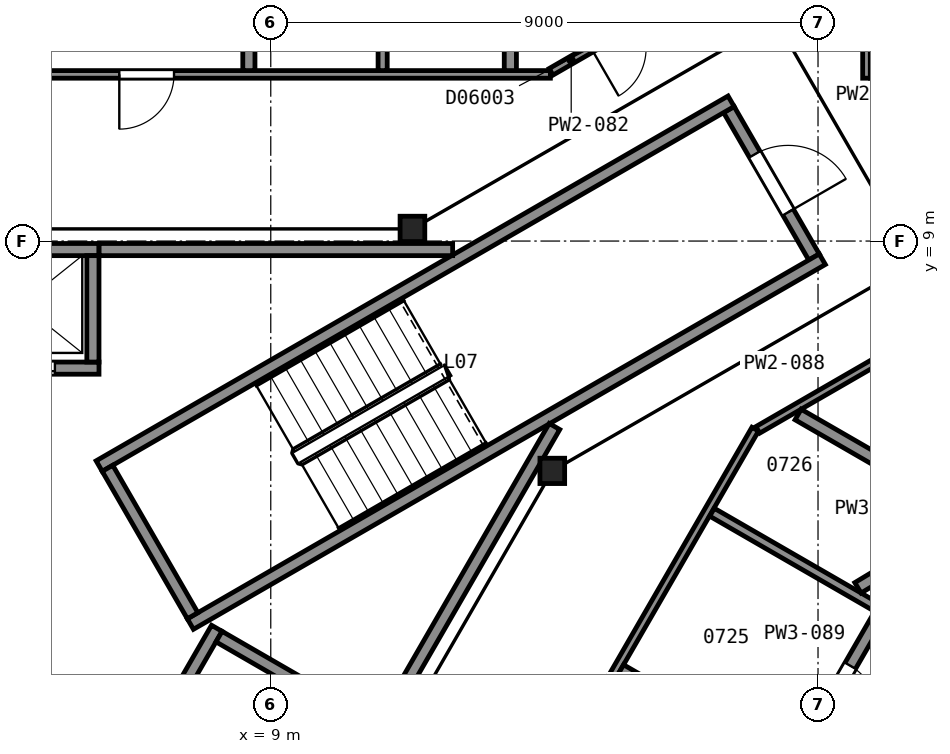
"""IFC4 building model, lengths in metres.
Left out: names, types, materials, properties, quantities, classifications, styles, units other than length and angle.
Written with IfcOpenShell. Run it as: python <this file> out.ifc"""

import sys

from ifc_helpers import new_model, si_unit, direction, frame, frame_2d, origin, origin_2d, place, context, subcontext, project, spatial, rectangle, i_section, extrude, element, fill, save


model = new_model("IFC4")
c1 = context("Model", 3, precision=1e-05, world=origin(), true_north=direction((0.0, 1.0)))
c2 = subcontext(c1, "Body", "Model", "MODEL_VIEW")
j1 = project(units=[si_unit("LENGTHUNIT", "METRE"), si_unit("PLANEANGLEUNIT", "RADIAN")], contexts=[c1])
p1 = place(None, origin())
s1 = spatial("IfcSite", under=j1, at=p1, CompositionType="ELEMENT")
p2 = place(p1, origin())
s2 = spatial("IfcBuilding", under=s1, at=p2, CompositionType="ELEMENT")
p3 = place(p2, frame((0.0, 0.0, 40.4)))
s3 = spatial("IfcBuildingStorey", under=s2, at=p3, CompositionType="ELEMENT", Elevation=40.4)
for number, where, z_axis, x_axis in (
    (1, (13.63, 5.22, 0.0), (0.0, 0.0, 1.0), (1.0, 0.0, 0.0)),
    (2, (11.33, 9.2, 0.0), (0.0, 0.0, 1.0), (1.0, 0.0, 0.0)),
):
    element("IfcColumn", number, at=place(p3, frame(where, z_axis=z_axis, x_axis=x_axis)), inside=s3, PredefinedType="COLUMN", context=c2, shape_type="SweptSolid", body=[
        extrude(i_section(OverallWidth=0.406, OverallDepth=0.417, WebThickness=0.03, FlangeThickness=0.048, FilletRadius=0.015, at=origin_2d()), origin(), (0.0, 0.0, 1.0), 3.6),
    ])
p4 = place(p3, frame((17.934, 8.738, 0.0), z_axis=(0.0, 0.0, 1.0), x_axis=(-0.49998411664, 0.866034573852, 0.0)))
e3 = element("IfcWall", 3, at=p4, inside=s3, PredefinedType="PARTITIONING", context=c2, shape_type="SweptSolid", body=[
    extrude(rectangle(XDim=2.8, YDim=0.2, at=frame_2d((1.4, 0.0))), origin(), (0.0, 0.0, 1.0), 3.35),
])
p5 = place(p4, frame((0.85, 0.0, 0.0)))
e4 = element("IfcOpeningElement", 4, at=p5, cuts=e3, PredefinedType="OPENING", context=c2, shape_type="SweptSolid", body=[
    extrude(rectangle(XDim=1.1, YDim=2.1, at=frame_2d((0.55, 1.05))), frame((0.0, 0.11, 0.0), z_axis=(0.0, -1.0, 0.0), x_axis=(1.0, 0.0, 0.0)), (0.0, 0.0, 1.0), 0.22),
])
for number, where, z_axis, x_axis in (
    (5, (6.178, 5.299, 0.0), (0.0, 0.0, 1.0), (0.866, 0.5, 0.0)),
    (6, (7.678, 2.701, 0.0), (0.0, 0.0, 1.0), (0.866, 0.5, 0.0)),
):
    element("IfcWall", number, at=place(p3, frame(where, z_axis=z_axis, x_axis=x_axis)), inside=s3, PredefinedType="PARTITIONING", context=c2, shape_type="SweptSolid", body=[
        extrude(rectangle(XDim=12.0, YDim=0.2, at=frame_2d((6.0, 0.0))), origin(), (0.0, 0.0, 1.0), 3.35),
    ])
p6 = place(p3, frame((7.715, 2.838, 0.0), z_axis=(0.0, 0.0, 1.0), x_axis=(-0.500049511043, 0.865996816683, 0.0)))
e7 = element("IfcWall", 7, at=p6, inside=s3, PredefinedType="PARTITIONING", context=c2, shape_type="SweptSolid", body=[
    extrude(rectangle(XDim=2.8, YDim=0.2, at=frame_2d((1.4, 0.0))), origin(), (0.0, 0.0, 1.0), 3.35),
])
p7 = place(p3, frame((3.625, 6.91, 0.0), z_axis=(0.0, 0.0, 1.0), x_axis=(1.0, 0.0, 0.0)))
e8 = element("IfcWall", 8, at=p7, inside=s3, PredefinedType="PARTITIONING", context=c2, shape_type="SweptSolid", body=[
    extrude(rectangle(XDim=2.55, YDim=0.2, at=frame_2d((1.275, 0.0))), origin(), (0.0, 0.0, 1.0), 3.6),
])
p8 = place(p7, frame((0.725, 0.0, 0.0)))
e9 = element("IfcOpeningElement", 9, at=p8, cuts=e8, PredefinedType="OPENING", context=c2, shape_type="SweptSolid", body=[
    extrude(rectangle(XDim=1.1, YDim=2.1, at=frame_2d((0.55, 1.05))), frame((0.0, 0.11, 0.0), z_axis=(0.0, -1.0, 0.0), x_axis=(1.0, 0.0, 0.0)), (0.0, 0.0, 1.0), 0.22),
])
p9 = place(p3, frame((3.625, 8.86, 0.0), z_axis=(0.0, 0.0, 1.0), x_axis=(1.0, 0.0, 0.0)))
e10 = element("IfcWall", 10, at=p9, inside=s3, PredefinedType="PARTITIONING", context=c2, shape_type="SweptSolid", body=[
    extrude(rectangle(XDim=2.55, YDim=0.2, at=frame_2d((1.275, 0.0))), origin(), (0.0, 0.0, 1.0), 3.6),
])
p10 = place(p3, frame((5.663, -1.612, 0.0), z_axis=(0.0, 0.0, 1.0), x_axis=(0.49998122708, 0.866036242063, 0.0)))
e11 = element("IfcWall", 11, at=p10, inside=s3, PredefinedType="PARTITIONING", context=c2, shape_type="SweptSolid", body=[
    extrude(rectangle(XDim=4.9, YDim=0.2, at=frame_2d((2.45, 0.0))), origin(), (0.0, 0.0, 1.0), 3.6),
])
p11 = place(p3, frame((6.075, 7.01, 0.0), z_axis=(0.0, 0.0, 1.0), x_axis=(0.0, 1.0, 0.0)))
e12 = element("IfcWall", 12, at=p11, inside=s3, PredefinedType="PARTITIONING", context=c2, shape_type="SweptSolid", body=[
    extrude(rectangle(XDim=1.75, YDim=0.2, at=frame_2d((0.875, 0.0))), origin(), (0.0, 0.0, 1.0), 3.6),
])
p12 = place(p3, frame((9.665, 1.62, 0.0), z_axis=(0.0, 0.0, 1.0), x_axis=(-0.866002029911, 0.500040482552, 0.0)))
e13 = element("IfcWall", 13, at=p12, inside=s3, PredefinedType="PARTITIONING", context=c2, shape_type="SweptSolid", body=[
    extrude(rectangle(XDim=1.75, YDim=0.2, at=frame_2d((0.875, 0.0))), origin(), (0.0, 0.0, 1.0), 3.6),
])
p13 = place(p3, frame((6.177, 8.86, 0.0), z_axis=(0.0, 0.0, 1.0), x_axis=(1.0, 0.0, 0.0)))
e14 = element("IfcWall", 14, at=p13, inside=s3, PredefinedType="PARTITIONING", context=c2, shape_type="SweptSolid", body=[
    extrude(rectangle(XDim=5.814, YDim=0.2, at=frame_2d((2.907, 0.0))), origin(), (0.0, 0.0, 1.0), 3.35),
])
p14 = place(p3, frame((8.492, -3.012, 0.0), z_axis=(0.0, 0.0, 1.0), x_axis=(0.499972957231, 0.866041016371, 0.0)))
e15 = element("IfcWall", 15, at=p14, inside=s3, PredefinedType="PARTITIONING", context=c2, shape_type="SweptSolid", body=[
    extrude(rectangle(XDim=10.349, YDim=0.2, at=frame_2d((5.174, 0.0))), origin(), (0.0, 0.0, 1.0), 3.35),
])
p15 = place(p3, frame((-13.598, 11.741, 0.0), z_axis=(0.0, 0.0, 1.0), x_axis=(1.0, 0.0, 0.0)))
e16 = element("IfcWall", 16, at=p15, inside=s3, PredefinedType="PARTITIONING", context=c2, shape_type="SweptSolid", body=[
    extrude(rectangle(XDim=27.197, YDim=0.125, at=frame_2d((13.598, 0.0))), origin(), (0.0, 0.0, 1.0), 2.613),
])
p16 = place(p15, frame((20.107, 0.0, 0.0)))
e17 = element("IfcOpeningElement", 17, at=p16, cuts=e16, PredefinedType="OPENING", context=c2, shape_type="SweptSolid", body=[
    extrude(rectangle(XDim=0.9, YDim=2.1, at=frame_2d((0.45, 1.05))), frame((0.0, 0.073, 0.0), z_axis=(0.0, -1.0, 0.0), x_axis=(1.0, 0.0, 0.0)), (0.0, 0.0, 1.0), 0.145),
])
p17 = place(p15, frame((16.97, 0.0, 0.0)))
e18 = element("IfcOpeningElement", 18, at=p17, cuts=e16, PredefinedType="OPENING", context=c2, shape_type="SweptSolid", body=[
    extrude(rectangle(XDim=0.9, YDim=2.1, at=frame_2d((0.45, 1.05))), frame((0.0, 0.073, 0.0), z_axis=(0.0, -1.0, 0.0), x_axis=(1.0, 0.0, 0.0)), (0.0, 0.0, 1.0), 0.145),
])
p18 = place(p15, frame((9.934, 0.0, 0.0)))
e19 = element("IfcOpeningElement", 19, at=p18, cuts=e16, PredefinedType="OPENING", context=c2, shape_type="SweptSolid", body=[
    extrude(rectangle(XDim=0.9, YDim=2.1, at=frame_2d((0.45, 1.05))), frame((0.0, 0.073, 0.0), z_axis=(0.0, -1.0, 0.0), x_axis=(1.0, 0.0, 0.0)), (0.0, 0.0, 1.0), 0.145),
])
p19 = place(p15, frame((6.858, 0.0, 0.0)))
e20 = element("IfcOpeningElement", 20, at=p19, cuts=e16, PredefinedType="OPENING", context=c2, shape_type="SweptSolid", body=[
    extrude(rectangle(XDim=1.0, YDim=2.1, at=frame_2d((0.5, 1.05))), frame((0.0, 0.073, 0.0), z_axis=(0.0, -1.0, 0.0), x_axis=(1.0, 0.0, 0.0)), (0.0, 0.0, 1.0), 0.145),
])
p20 = place(p3, frame((16.967, 5.906, 0.0), z_axis=(0.0, 0.0, 1.0), x_axis=(-0.500024758804, -0.866011108811, 0.0)))
e21 = element("IfcWall", 21, at=p20, inside=s3, PredefinedType="PARTITIONING", context=c2, shape_type="SweptSolid", body=[
    extrude(rectangle(XDim=26.402, YDim=0.125, at=frame_2d((13.201, 0.0))), origin(), (0.0, 0.0, 1.0), 2.613),
])
p21 = place(p20, frame((24.689, 0.0, 0.0)))
e22 = element("IfcOpeningElement", 22, at=p21, cuts=e21, PredefinedType="OPENING", context=c2, shape_type="SweptSolid", body=[
    extrude(rectangle(XDim=0.9, YDim=2.1, at=frame_2d((0.45, 1.05))), frame((0.0, 0.073, 0.0), z_axis=(0.0, -1.0, 0.0), x_axis=(1.0, 0.0, 0.0)), (0.0, 0.0, 1.0), 0.145),
])
p22 = place(p20, frame((17.709, 0.0, 0.0)))
e23 = element("IfcOpeningElement", 23, at=p22, cuts=e21, PredefinedType="OPENING", context=c2, shape_type="SweptSolid", body=[
    extrude(rectangle(XDim=0.9, YDim=2.1, at=frame_2d((0.45, 1.05))), frame((0.0, 0.073, 0.0), z_axis=(0.0, -1.0, 0.0), x_axis=(1.0, 0.0, 0.0)), (0.0, 0.0, 1.0), 0.145),
])
p23 = place(p20, frame((14.928, 0.0, 0.0)))
e24 = element("IfcOpeningElement", 24, at=p23, cuts=e21, PredefinedType="OPENING", context=c2, shape_type="SweptSolid", body=[
    extrude(rectangle(XDim=0.9, YDim=2.1, at=frame_2d((0.45, 1.05))), frame((0.0, 0.073, 0.0), z_axis=(0.0, -1.0, 0.0), x_axis=(1.0, 0.0, 0.0)), (0.0, 0.0, 1.0), 0.145),
])
p24 = place(p20, frame((8.2, 0.0, 0.0)))
e25 = element("IfcOpeningElement", 25, at=p24, cuts=e21, PredefinedType="OPENING", context=c2, shape_type="SweptSolid", body=[
    extrude(rectangle(XDim=0.9, YDim=2.1, at=frame_2d((0.45, 1.05))), frame((0.0, 0.073, 0.0), z_axis=(0.0, -1.0, 0.0), x_axis=(1.0, 0.0, 0.0)), (0.0, 0.0, 1.0), 0.145),
])
p25 = place(p20, frame((5.473, 0.0, 0.0)))
e26 = element("IfcOpeningElement", 26, at=p25, cuts=e21, PredefinedType="OPENING", context=c2, shape_type="SweptSolid", body=[
    extrude(rectangle(XDim=1.0, YDim=2.1, at=frame_2d((0.5, 1.05))), frame((0.0, 0.073, 0.0), z_axis=(0.0, -1.0, 0.0), x_axis=(1.0, 0.0, 0.0)), (0.0, 0.0, 1.0), 0.145),
])
p26 = place(p3, frame((8.64, 11.803, 0.0), z_axis=(0.0, 0.0, 1.0), x_axis=(0.0, 1.0, 0.0)))
e27 = element("IfcWall", 27, at=p26, inside=s3, PredefinedType="PARTITIONING", context=c2, shape_type="SweptSolid", body=[
    extrude(rectangle(XDim=2.838, YDim=0.2, at=frame_2d((1.419, 0.0))), origin(), (0.0, 0.0, 1.0), 2.613),
])
p27 = place(p3, frame((10.84, 11.803, 0.0), z_axis=(0.0, 0.0, 1.0), x_axis=(0.0, 1.0, 0.0)))
e28 = element("IfcWall", 28, at=p27, inside=s3, PredefinedType="PARTITIONING", context=c2, shape_type="SweptSolid", body=[
    extrude(rectangle(XDim=8.592, YDim=0.15, at=frame_2d((4.296, 0.0))), origin(), (0.0, 0.0, 1.0), 2.613),
])
p28 = place(p3, frame((12.94, 11.803, 0.0), z_axis=(0.0, 0.0, 1.0), x_axis=(0.0, 1.0, 0.0)))
e29 = element("IfcWall", 29, at=p28, inside=s3, PredefinedType="PARTITIONING", context=c2, shape_type="SweptSolid", body=[
    extrude(rectangle(XDim=2.812, YDim=0.2, at=frame_2d((1.406, 0.0))), origin(), (0.0, 0.0, 1.0), 2.613),
])
p29 = place(p3, frame((13.61, 11.783, 0.0), z_axis=(0.0, 0.0, 1.0), x_axis=(0.86608938841, 0.499889158998, 0.0)))
e30 = element("IfcWall", 30, at=p29, inside=s3, PredefinedType="PARTITIONING", context=c2, shape_type="SweptSolid", body=[
    extrude(rectangle(XDim=2.409, YDim=0.125, at=frame_2d((1.204, 0.0))), origin(), (0.0, 0.0, 1.0), 2.613),
])
p30 = place(p29, frame((0.765, 0.0, 0.0)))
e31 = element("IfcOpeningElement", 31, at=p30, cuts=e30, PredefinedType="OPENING", context=c2, shape_type="SweptSolid", body=[
    extrude(rectangle(XDim=0.9, YDim=2.1, at=frame_2d((0.45, 1.05))), frame((0.0, 0.073, 0.0), z_axis=(0.0, -1.0, 0.0), x_axis=(1.0, 0.0, 0.0)), (0.0, 0.0, 1.0), 0.145),
])
p31 = place(p3, frame((14.752, 1.945, 0.0), z_axis=(0.0, 0.0, 1.0), x_axis=(0.866033317326, -0.499986293093, 0.0)))
e32 = element("IfcWall", 32, at=p31, inside=s3, PredefinedType="PARTITIONING", context=c2, shape_type="SweptSolid", body=[
    extrude(rectangle(XDim=3.337, YDim=0.2, at=frame_2d((1.669, 0.0))), origin(), (0.0, 0.0, 1.0), 2.613),
])
p32 = place(p3, frame((16.256, 4.54, 0.0), z_axis=(0.0, 0.0, 1.0), x_axis=(0.866031705461, -0.499989085017, 0.0)))
e33 = element("IfcWall", 33, at=p32, inside=s3, PredefinedType="PARTITIONING", context=c2, shape_type="SweptSolid", body=[
    extrude(rectangle(XDim=8.587, YDim=0.15, at=frame_2d((4.293, 0.0))), origin(), (0.0, 0.0, 1.0), 2.613),
])
p33 = place(p3, frame((17.01, 5.895, 0.0), z_axis=(0.0, 0.0, 1.0), x_axis=(0.865944638795, 0.50013986298, 0.0)))
e34 = element("IfcWall", 34, at=p33, inside=s3, PredefinedType="PARTITIONING", context=c2, shape_type="SweptSolid", body=[
    extrude(rectangle(XDim=2.599, YDim=0.125, at=frame_2d((1.299, 0.0))), origin(), (0.0, 0.0, 1.0), 2.613),
])
p34 = place(p3, frame((17.606, 0.413, 0.0), z_axis=(0.0, 0.0, 1.0), x_axis=(0.500024172624, 0.866011447264, 0.0)))
e35 = element("IfcWall", 35, at=p34, inside=s3, PredefinedType="PARTITIONING", context=c2, shape_type="SweptSolid", body=[
    extrude(rectangle(XDim=2.825, YDim=0.2, at=frame_2d((1.413, 0.0))), origin(), (0.0, 0.0, 1.0), 2.613),
])
p35 = place(p34, frame((0.95, 0.0, 0.0)))
e36 = element("IfcOpeningElement", 36, at=p35, cuts=e35, PredefinedType="OPENING", context=c2, shape_type="SweptSolid", body=[
    extrude(rectangle(XDim=0.9, YDim=2.1, at=frame_2d((0.45, 1.05))), frame((0.0, 0.11, 0.0), z_axis=(0.0, -1.0, 0.0), x_axis=(1.0, 0.0, 0.0)), (0.0, 0.0, 1.0), 0.22),
])
p36 = place(p3, frame((17.673, 6.147, 0.0), z_axis=(0.0, 0.0, 1.0), x_axis=(0.866077754448, -0.499909315027, 0.0)))
e37 = element("IfcWall", 37, at=p36, inside=s3, PredefinedType="PARTITIONING", context=c2, shape_type="SweptSolid", body=[
    extrude(rectangle(XDim=3.469, YDim=0.2, at=frame_2d((1.734, 0.0))), origin(), (0.0, 0.0, 1.0), 2.613),
])
p37 = place(p3, frame((18.657, 3.297, 0.0), z_axis=(0.0, 0.0, 1.0), x_axis=(0.856262573572, 0.51654080681, 0.0)))
e38 = element("IfcWall", 38, at=p37, inside=s3, PredefinedType="PARTITIONING", context=c2, shape_type="SweptSolid", body=[
    extrude(rectangle(XDim=2.088, YDim=0.2, at=frame_2d((1.044, 0.0))), origin(), (0.0, 0.0, 1.0), 2.613),
])
p38 = place(p37, frame((0.659, 0.0, 0.0)))
e39 = element("IfcOpeningElement", 39, at=p38, cuts=e38, PredefinedType="OPENING", context=c2, shape_type="SweptSolid", body=[
    extrude(rectangle(XDim=0.8, YDim=2.1, at=frame_2d((0.4, 1.05))), frame((0.0, 0.11, 0.0), z_axis=(0.0, -1.0, 0.0), x_axis=(1.0, 0.0, 0.0)), (0.0, 0.0, 1.0), 0.22),
])
p39 = place(p3, frame((18.797, 11.678, 0.0), z_axis=(0.0, 0.0, 1.0), x_axis=(0.0, 1.0, 0.0)))
e40 = element("IfcWall", 40, at=p39, inside=s3, PredefinedType="PARTITIONING", context=c2, shape_type="SweptSolid", body=[
    extrude(rectangle(XDim=2.394, YDim=0.125, at=frame_2d((1.197, 0.0))), origin(), (0.0, 0.0, 1.0), 2.613),
])
p40 = place(p5, origin())
e41 = element("IfcDoor", 41, at=p40, inside=s3, OperationType="SINGLE_SWING_LEFT", PredefinedType="DOOR", context=c2, shape_type="SweptSolid", body=[
    extrude(rectangle(XDim=1.1, YDim=2.1, at=frame_2d((0.55, 1.05))), frame((0.0, 0.025, 0.0), z_axis=(0.0, -1.0, 0.0), x_axis=(1.0, 0.0, 0.0)), (0.0, 0.0, 1.0), 0.05),
])
fill(e4, e41)
p41 = place(p8, origin())
e42 = element("IfcDoor", 42, at=p41, inside=s3, OperationType="SLIDING_TO_LEFT", PredefinedType="DOOR", context=c2, shape_type="SweptSolid", body=[
    extrude(rectangle(XDim=1.1, YDim=2.1, at=frame_2d((0.55, 1.05))), frame((0.0, 0.025, 0.0), z_axis=(0.0, -1.0, 0.0), x_axis=(1.0, 0.0, 0.0)), (0.0, 0.0, 1.0), 0.05),
])
fill(e9, e42)
p42 = place(p16, origin())
e43 = element("IfcDoor", 43, at=p42, inside=s3, OperationType="SINGLE_SWING_LEFT", PredefinedType="DOOR", context=c2, shape_type="SweptSolid", body=[
    extrude(rectangle(XDim=0.9, YDim=2.1, at=frame_2d((0.45, 1.05))), frame((0.0, 0.025, 0.0), z_axis=(0.0, -1.0, 0.0), x_axis=(1.0, 0.0, 0.0)), (0.0, 0.0, 1.0), 0.05),
])
fill(e17, e43)
p43 = place(p35, origin())
e44 = element("IfcDoor", 44, at=p43, inside=s3, OperationType="SINGLE_SWING_LEFT", PredefinedType="DOOR", context=c2, shape_type="SweptSolid", body=[
    extrude(rectangle(XDim=0.9, YDim=2.1, at=frame_2d((0.45, 1.05))), frame((0.0, 0.025, 0.0), z_axis=(0.0, -1.0, 0.0), x_axis=(1.0, 0.0, 0.0)), (0.0, 0.0, 1.0), 0.05),
])
fill(e36, e44)
save(model, sys.argv[1])
